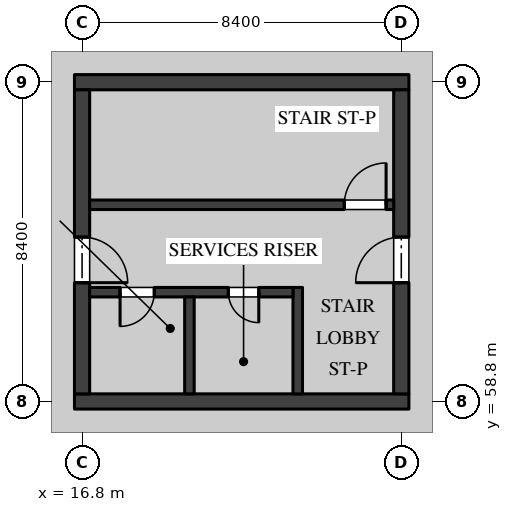
"""IFC4 building model, lengths in metres.
Left out: names, types, materials, properties, quantities, classifications, styles, units other than length and angle.
Written with IfcOpenShell. Run it as: python <this file> out.ifc"""

import sys

from ifc_helpers import new_model, si_unit, direction, frame, frame_2d, origin, place, context, subcontext, project, spatial, rectangle, extrude, element, fill, save


model = new_model("IFC4")
c1 = context("Model", 3, precision=1e-05, world=origin(), true_north=direction((0.0, 1.0)))
c2 = subcontext(c1, "Body", "Model", "MODEL_VIEW")
j1 = project(units=[si_unit("LENGTHUNIT", "METRE"), si_unit("PLANEANGLEUNIT", "RADIAN")], contexts=[c1])
p1 = place(None, origin())
s1 = spatial("IfcSite", under=j1, at=p1, CompositionType="ELEMENT")
p2 = place(p1, origin())
s2 = spatial("IfcBuilding", under=s1, at=p2, CompositionType="ELEMENT")
p3 = place(p2, frame((0.0, 0.0, -4.5)))
s3 = spatial("IfcBuildingStorey", under=s2, at=p3, CompositionType="ELEMENT", Elevation=-4.5)
for number, where, z_axis, x_axis in (
    (1, (16.6, 58.8, 0.0), (0.0, 0.0, 1.0), (1.0, 0.0, 0.0)),
    (2, (16.6, 67.2, 0.0), (0.0, 0.0, 1.0), (1.0, 0.0, 0.0)),
):
    element("IfcWall", number, at=place(p3, frame(where, z_axis=z_axis, x_axis=x_axis)), inside=s3, PredefinedType="SHEAR", context=c2, shape_type="SweptSolid", body=[
        extrude(rectangle(XDim=8.8, YDim=0.4, at=frame_2d((4.4, 0.0))), origin(), (0.0, 0.0, 1.0), 4.05),
    ])
p4 = place(p3, frame((16.8, 59.0, 0.0), z_axis=(0.0, 0.0, 1.0), x_axis=(0.0, 1.0, 0.0)))
e3 = element("IfcWall", 3, at=p4, inside=s3, PredefinedType="SHEAR", context=c2, shape_type="SweptSolid", body=[
    extrude(rectangle(XDim=8.0, YDim=0.4, at=frame_2d((4.0, 0.0))), origin(), (0.0, 0.0, 1.0), 4.05),
])
p5 = place(p4, frame((2.925, 0.0, 0.0)))
e4 = element("IfcOpeningElement", 4, at=p5, cuts=e3, PredefinedType="OPENING", context=c2, shape_type="SweptSolid", body=[
    extrude(rectangle(XDim=1.2, YDim=2.1, at=frame_2d((0.6, 1.05))), frame((0.0, 0.21, 0.0), z_axis=(0.0, -1.0, 0.0), x_axis=(1.0, 0.0, 0.0)), (0.0, 0.0, 1.0), 0.42),
])
p6 = place(p3, frame((25.2, 59.0, 0.0), z_axis=(0.0, 0.0, 1.0), x_axis=(0.0, 1.0, 0.0)))
e5 = element("IfcWall", 5, at=p6, inside=s3, PredefinedType="SHEAR", context=c2, shape_type="SweptSolid", body=[
    extrude(rectangle(XDim=8.0, YDim=0.4, at=frame_2d((4.0, 0.0))), origin(), (0.0, 0.0, 1.0), 4.05),
])
p7 = place(p6, frame((2.925, 0.0, 0.0)))
e6 = element("IfcOpeningElement", 6, at=p7, cuts=e5, PredefinedType="OPENING", context=c2, shape_type="SweptSolid", body=[
    extrude(rectangle(XDim=1.2, YDim=2.1, at=frame_2d((0.6, 1.05))), frame((0.0, 0.21, 0.0), z_axis=(0.0, -1.0, 0.0), x_axis=(1.0, 0.0, 0.0)), (0.0, 0.0, 1.0), 0.42),
])
p8 = place(p3, frame((25.0, 63.975, 0.0), z_axis=(0.0, 0.0, 1.0), x_axis=(-1.0, 0.0, 0.0)))
e7 = element("IfcWall", 7, at=p8, inside=s3, PredefinedType="SOLIDWALL", context=c2, shape_type="SweptSolid", body=[
    extrude(rectangle(XDim=8.0, YDim=0.25, at=frame_2d((4.0, 0.0))), origin(), (0.0, 0.0, 1.0), 4.05),
])
p9 = place(p8, frame((0.2, 0.0, 0.0)))
e8 = element("IfcOpeningElement", 8, at=p9, cuts=e7, PredefinedType="OPENING", context=c2, shape_type="SweptSolid", body=[
    extrude(rectangle(XDim=1.1, YDim=2.1, at=frame_2d((0.55, 1.05))), frame((0.0, 0.135, 0.0), z_axis=(0.0, -1.0, 0.0), x_axis=(1.0, 0.0, 0.0)), (0.0, 0.0, 1.0), 0.27),
])
p10 = place(p3, frame((22.475, 61.8, 0.0), z_axis=(0.0, 0.0, 1.0), x_axis=(0.0, -1.0, 0.0)))
e9 = element("IfcWall", 9, at=p10, inside=s3, PredefinedType="SOLIDWALL", context=c2, shape_type="SweptSolid", body=[
    extrude(rectangle(XDim=2.8, YDim=0.25, at=frame_2d((1.4, 0.0))), origin(), (0.0, 0.0, 1.0), 4.05),
])
p11 = place(p3, frame((22.35, 61.675, 0.0), z_axis=(0.0, 0.0, 1.0), x_axis=(-1.0, 0.0, 0.0)))
e10 = element("IfcWall", 10, at=p11, inside=s3, PredefinedType="SOLIDWALL", context=c2, shape_type="SweptSolid", body=[
    extrude(rectangle(XDim=5.35, YDim=0.25, at=frame_2d((2.675, 0.0))), origin(), (0.0, 0.0, 1.0), 4.05),
])
p12 = place(p11, frame((3.65, 0.0, 0.0)))
e11 = element("IfcOpeningElement", 11, at=p12, cuts=e10, PredefinedType="OPENING", context=c2, shape_type="SweptSolid", body=[
    extrude(rectangle(XDim=0.9, YDim=2.1, at=frame_2d((0.45, 1.05))), frame((0.0, 0.135, 0.0), z_axis=(0.0, -1.0, 0.0), x_axis=(1.0, 0.0, 0.0)), (0.0, 0.0, 1.0), 0.27),
])
p13 = place(p11, frame((0.9, 0.0, 0.0)))
e12 = element("IfcOpeningElement", 12, at=p13, cuts=e10, PredefinedType="OPENING", context=c2, shape_type="SweptSolid", body=[
    extrude(rectangle(XDim=0.8, YDim=2.1, at=frame_2d((0.4, 1.05))), frame((0.0, 0.135, 0.0), z_axis=(0.0, -1.0, 0.0), x_axis=(1.0, 0.0, 0.0)), (0.0, 0.0, 1.0), 0.27),
])
p14 = place(p3, frame((19.625, 61.55, 0.0), z_axis=(0.0, 0.0, 1.0), x_axis=(0.0, -1.0, 0.0)))
e13 = element("IfcWall", 13, at=p14, inside=s3, PredefinedType="SOLIDWALL", context=c2, shape_type="SweptSolid", body=[
    extrude(rectangle(XDim=2.55, YDim=0.25, at=frame_2d((1.275, 0.0))), origin(), (0.0, 0.0, 1.0), 4.05),
])
p15 = place(p12, origin())
e14 = element("IfcDoor", 14, at=p15, inside=s3, OperationType="SINGLE_SWING_LEFT", PredefinedType="DOOR", context=c2, shape_type="SweptSolid", body=[
    extrude(rectangle(XDim=0.9, YDim=2.1, at=frame_2d((0.45, 1.05))), frame((0.0, 0.035, 0.0), z_axis=(0.0, -1.0, 0.0), x_axis=(1.0, 0.0, 0.0)), (0.0, 0.0, 1.0), 0.07),
])
fill(e11, e14)
p16 = place(p5, frame((1.2, 0.0, 0.0), z_axis=(0.0, 0.0, 1.0), x_axis=(-1.0, 0.0, 0.0)))
e15 = element("IfcDoor", 15, at=p16, inside=s3, OperationType="SINGLE_SWING_LEFT", PredefinedType="DOOR", context=c2, shape_type="SweptSolid", body=[
    extrude(rectangle(XDim=1.2, YDim=2.1, at=frame_2d((0.6, 1.05))), frame((0.0, 0.035, 0.0), z_axis=(0.0, -1.0, 0.0), x_axis=(1.0, 0.0, 0.0)), (0.0, 0.0, 1.0), 0.07),
])
fill(e4, e15)
p17 = place(p7, origin())
e16 = element("IfcDoor", 16, at=p17, inside=s3, OperationType="SINGLE_SWING_RIGHT", PredefinedType="DOOR", context=c2, shape_type="SweptSolid", body=[
    extrude(rectangle(XDim=1.2, YDim=2.1, at=frame_2d((0.6, 1.05))), frame((0.0, 0.035, 0.0), z_axis=(0.0, -1.0, 0.0), x_axis=(1.0, 0.0, 0.0)), (0.0, 0.0, 1.0), 0.07),
])
fill(e6, e16)
p18 = place(p13, origin())
e17 = element("IfcDoor", 17, at=p18, inside=s3, OperationType="SINGLE_SWING_RIGHT", PredefinedType="DOOR", context=c2, shape_type="SweptSolid", body=[
    extrude(rectangle(XDim=0.8, YDim=2.1, at=frame_2d((0.4, 1.05))), frame((0.0, 0.035, 0.0), z_axis=(0.0, -1.0, 0.0), x_axis=(1.0, 0.0, 0.0)), (0.0, 0.0, 1.0), 0.07),
])
fill(e12, e17)
p19 = place(p9, frame((1.1, 0.0, 0.0), z_axis=(0.0, 0.0, 1.0), x_axis=(-1.0, 0.0, 0.0)))
e18 = element("IfcDoor", 18, at=p19, inside=s3, OperationType="SINGLE_SWING_LEFT", PredefinedType="DOOR", context=c2, shape_type="SweptSolid", body=[
    extrude(rectangle(XDim=1.1, YDim=2.1, at=frame_2d((0.55, 1.05))), frame((0.0, 0.035, 0.0), z_axis=(0.0, -1.0, 0.0), x_axis=(1.0, 0.0, 0.0)), (0.0, 0.0, 1.0), 0.07),
])
fill(e8, e18)
save(model, sys.argv[1])
